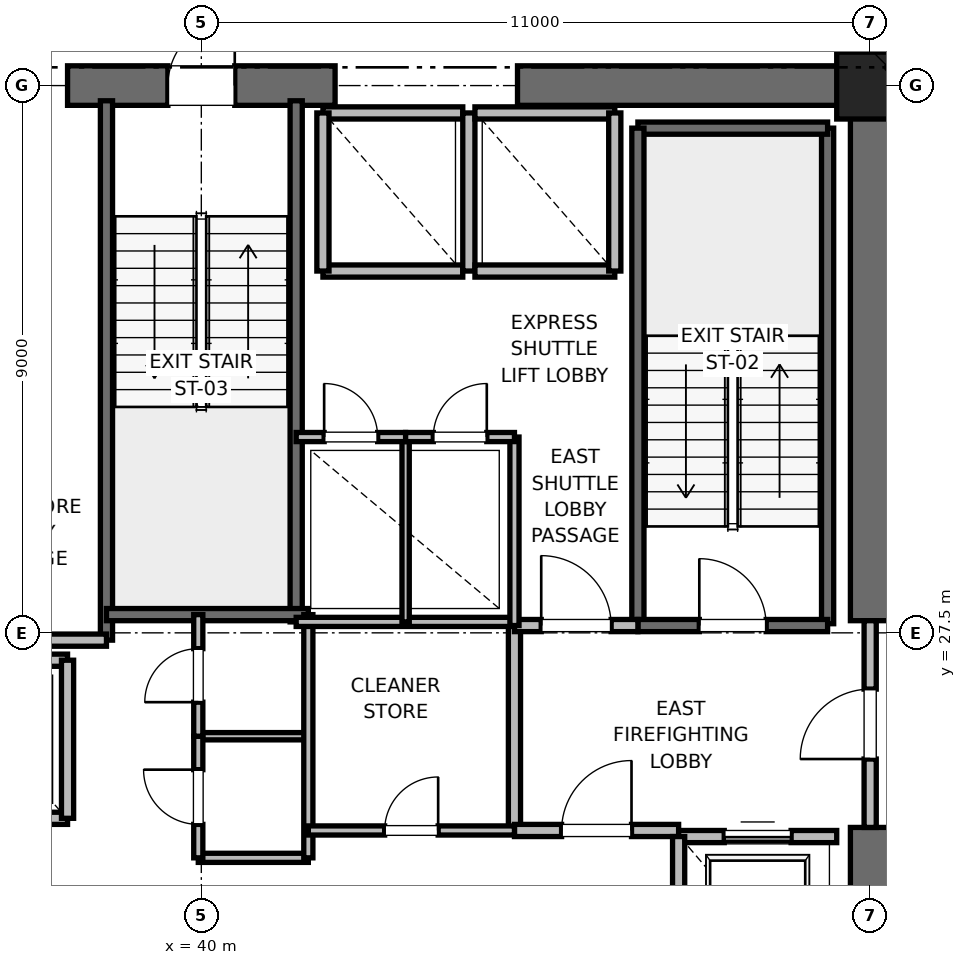
"""IFC4 building model, lengths in metres.
Left out: names, types, materials, properties, quantities, classifications, styles, units other than length and angle.
Written with IfcOpenShell. Run it as: python <this file> out.ifc"""

import sys

from ifc_helpers import new_model, si_unit, direction, frame, frame_2d, origin, origin_2d, place, context, subcontext, project, spatial, rectangle, extrude, element, fill, save


model = new_model("IFC4")
c1 = context("Model", 3, precision=1e-05, world=origin(), true_north=direction((0.0, 1.0)))
c2 = subcontext(c1, "Body", "Model", "MODEL_VIEW")
j1 = project(units=[si_unit("LENGTHUNIT", "METRE"), si_unit("PLANEANGLEUNIT", "RADIAN")], contexts=[c1])
p1 = place(None, origin())
s1 = spatial("IfcSite", under=j1, at=p1, CompositionType="ELEMENT")
p2 = place(p1, origin())
s2 = spatial("IfcBuilding", under=s1, at=p2, CompositionType="ELEMENT")
p3 = place(p2, frame((0.0, 0.0, 59.6)))
s3 = spatial("IfcBuildingStorey", under=s2, at=p3, CompositionType="ELEMENT", Elevation=59.6)
p4 = place(p3, frame((51.0, 36.5, 0.0), z_axis=(0.0, 0.0, 1.0), x_axis=(1.0, 0.0, 0.0)))
e1 = element("IfcColumn", 1, at=p4, inside=s3, PredefinedType="PILASTER", context=c2, shape_type="SweptSolid", body=[
    extrude(rectangle(XDim=1.1, YDim=1.1, at=origin_2d()), origin(), (0.0, 0.0, 1.0), 4.0),
])
p5 = place(p3, frame((37.8, 36.5, 0.0), z_axis=(0.0, 0.0, 1.0), x_axis=(1.0, 0.0, 0.0)))
e2 = element("IfcWall", 2, at=p5, inside=s3, PredefinedType="SHEAR", context=c2, shape_type="SweptSolid", body=[
    extrude(rectangle(XDim=4.4, YDim=0.65, at=frame_2d((2.2, 0.0))), origin(), (0.0, 0.0, 1.0), 3.76),
])
p6 = place(p5, frame((1.65, 0.0, 0.0)))
e3 = element("IfcOpeningElement", 3, at=p6, cuts=e2, PredefinedType="OPENING", context=c2, shape_type="SweptSolid", body=[
    extrude(rectangle(XDim=1.1, YDim=2.15, at=frame_2d((0.55, 1.075))), frame((0.0, 0.325, 0.0), z_axis=(0.0, -1.0, 0.0), x_axis=(1.0, 0.0, 0.0)), (0.0, 0.0, 1.0), 0.65),
])
for number, where, z_axis, x_axis in (
    (4, (45.2, 36.5, 0.0), (0.0, 0.0, 1.0), (1.0, 0.0, 0.0)),
    (5, (51.0, 18.5, 0.0), (0.0, 0.0, 1.0), (0.0, 1.0, 0.0)),
):
    element("IfcWall", number, at=place(p3, frame(where, z_axis=z_axis, x_axis=x_axis)), inside=s3, PredefinedType="SHEAR", context=c2, shape_type="SweptSolid", body=[
        extrude(rectangle(XDim=5.8, YDim=0.65, at=frame_2d((2.9, 0.0))), origin(), (0.0, 0.0, 1.0), 3.76),
    ])
p7 = place(p3, frame((51.0, 27.7, 0.0), z_axis=(0.0, 0.0, 1.0), x_axis=(0.0, 1.0, 0.0)))
e6 = element("IfcWall", 6, at=p7, inside=s3, PredefinedType="SHEAR", context=c2, shape_type="SweptSolid", body=[
    extrude(rectangle(XDim=8.8, YDim=0.65, at=frame_2d((4.4, 0.0))), origin(), (0.0, 0.0, 1.0), 3.76),
])
p8 = place(p3, frame((50.3, 27.65, 0.0), z_axis=(0.0, 0.0, 1.0), x_axis=(0.0, 1.0, 0.0)))
e7 = element("IfcWall", 7, at=p8, inside=s3, PredefinedType="SOLIDWALL", context=c2, shape_type="SweptSolid", body=[
    extrude(rectangle(XDim=8.15, YDim=0.2, at=frame_2d((4.075, 0.0))), origin(), (0.0, 0.0, 1.0), 3.76),
])
p9 = place(p3, frame((47.18, 35.8, 0.0), z_axis=(0.0, 0.0, 1.0), x_axis=(1.0, 0.0, 0.0)))
e8 = element("IfcWall", 8, at=p9, inside=s3, PredefinedType="SOLIDWALL", context=c2, shape_type="SweptSolid", body=[
    extrude(rectangle(XDim=3.12, YDim=0.2, at=frame_2d((1.56, 0.0))), origin(), (0.0, 0.0, 1.0), 3.76),
])
p10 = place(p3, frame((47.18, 27.62, 0.0), z_axis=(0.0, 0.0, 1.0), x_axis=(0.0, 1.0, 0.0)))
e9 = element("IfcWall", 9, at=p10, inside=s3, PredefinedType="SOLIDWALL", context=c2, shape_type="SweptSolid", body=[
    extrude(rectangle(XDim=8.18, YDim=0.2, at=frame_2d((4.09, 0.0))), origin(), (0.0, 0.0, 1.0), 3.76),
])
p11 = place(p3, frame((47.18, 27.62, 0.0), z_axis=(0.0, 0.0, 1.0), x_axis=(1.0, 0.0, 0.0)))
e10 = element("IfcWall", 10, at=p11, inside=s3, PredefinedType="SOLIDWALL", context=c2, shape_type="SweptSolid", body=[
    extrude(rectangle(XDim=3.12, YDim=0.2, at=frame_2d((1.56, 0.0))), origin(), (0.0, 0.0, 1.0), 3.76),
])
p12 = place(p11, frame((1.01, 0.0, 0.0)))
e11 = element("IfcOpeningElement", 11, at=p12, cuts=e10, PredefinedType="OPENING", context=c2, shape_type="SweptSolid", body=[
    extrude(rectangle(XDim=1.1, YDim=2.15, at=frame_2d((0.55, 1.075))), frame((0.0, 0.1, 0.0), z_axis=(0.0, -1.0, 0.0), x_axis=(1.0, 0.0, 0.0)), (0.0, 0.0, 1.0), 0.2),
])
p13 = place(p3, frame((38.44, 27.38, 0.0), z_axis=(0.0, 0.0, 1.0), x_axis=(0.0, 1.0, 0.0)))
e12 = element("IfcWall", 12, at=p13, inside=s3, PredefinedType="SOLIDWALL", context=c2, shape_type="SweptSolid", body=[
    extrude(rectangle(XDim=8.87, YDim=0.2, at=frame_2d((4.435, 0.0))), origin(), (0.0, 0.0, 1.0), 3.76),
])
p14 = place(p3, frame((41.56, 27.68, 0.0), z_axis=(0.0, 0.0, 1.0), x_axis=(0.0, 1.0, 0.0)))
e13 = element("IfcWall", 13, at=p14, inside=s3, PredefinedType="SOLIDWALL", context=c2, shape_type="SweptSolid", body=[
    extrude(rectangle(XDim=8.57, YDim=0.2, at=frame_2d((4.285, 0.0))), origin(), (0.0, 0.0, 1.0), 3.76),
])
p15 = place(p3, frame((38.44, 27.8, 0.0), z_axis=(0.0, 0.0, 1.0), x_axis=(1.0, 0.0, 0.0)))
e14 = element("IfcWall", 14, at=p15, inside=s3, PredefinedType="SOLIDWALL", context=c2, shape_type="SweptSolid", body=[
    extrude(rectangle(XDim=3.32, YDim=0.2, at=frame_2d((1.66, 0.0))), origin(), (0.0, 0.0, 1.0), 3.76),
])
p16 = place(p3, frame((32.82, 27.38, 0.0), z_axis=(0.0, 0.0, 1.0), x_axis=(1.0, 0.0, 0.0)))
e15 = element("IfcWall", 15, at=p16, inside=s3, PredefinedType="PARTITIONING", context=c2, shape_type="SweptSolid", body=[
    extrude(rectangle(XDim=5.62, YDim=0.2, at=frame_2d((2.81, 0.0))), origin(), (0.0, 0.0, 1.0), 3.76),
])
p17 = place(p3, frame((45.15, 24.25, 0.0), z_axis=(0.0, 0.0, 1.0), x_axis=(0.0, 1.0, 0.0)))
e16 = element("IfcWall", 16, at=p17, inside=s3, PredefinedType="PARTITIONING", context=c2, shape_type="SweptSolid", body=[
    extrude(rectangle(XDim=3.37, YDim=0.2, at=frame_2d((1.685, 0.0))), origin(), (0.0, 0.0, 1.0), 3.76),
])
p18 = place(p3, frame((45.15, 24.25, 0.0), z_axis=(0.0, 0.0, 1.0), x_axis=(1.0, 0.0, 0.0)))
e17 = element("IfcWall", 17, at=p18, inside=s3, PredefinedType="PARTITIONING", context=c2, shape_type="SweptSolid", body=[
    extrude(rectangle(XDim=2.7, YDim=0.2, at=frame_2d((1.35, 0.0))), origin(), (0.0, 0.0, 1.0), 3.76),
])
p19 = place(p18, frame((0.775, 0.0, 0.0)))
e18 = element("IfcOpeningElement", 18, at=p19, cuts=e17, PredefinedType="OPENING", context=c2, shape_type="SweptSolid", body=[
    extrude(rectangle(XDim=1.15, YDim=2.2, at=frame_2d((0.575, 1.1))), frame((0.0, 0.1, 0.0), z_axis=(0.0, -1.0, 0.0), x_axis=(1.0, 0.0, 0.0)), (0.0, 0.0, 1.0), 0.2),
])
p20 = place(p3, frame((45.15, 27.62, 0.0), z_axis=(0.0, 0.0, 1.0), x_axis=(1.0, 0.0, 0.0)))
e19 = element("IfcWall", 19, at=p20, inside=s3, PredefinedType="PARTITIONING", context=c2, shape_type="SweptSolid", body=[
    extrude(rectangle(XDim=2.03, YDim=0.2, at=frame_2d((1.015, 0.0))), origin(), (0.0, 0.0, 1.0), 3.76),
])
p21 = place(p20, frame((0.44, 0.0, 0.0)))
e20 = element("IfcOpeningElement", 20, at=p21, cuts=e19, PredefinedType="OPENING", context=c2, shape_type="SweptSolid", body=[
    extrude(rectangle(XDim=1.15, YDim=2.2, at=frame_2d((0.575, 1.1))), frame((0.0, 0.1, 0.0), z_axis=(0.0, -1.0, 0.0), x_axis=(1.0, 0.0, 0.0)), (0.0, 0.0, 1.0), 0.2),
])
p22 = place(p3, frame((51.0, 24.3, 0.0), z_axis=(0.0, 0.0, 1.0), x_axis=(0.0, 1.0, 0.0)))
e21 = element("IfcWall", 21, at=p22, inside=s3, PredefinedType="PARTITIONING", context=c2, shape_type="SweptSolid", body=[
    extrude(rectangle(XDim=3.4, YDim=0.2, at=frame_2d((1.7, 0.0))), origin(), (0.0, 0.0, 1.0), 2.54),
])
p23 = place(p22, frame((1.125, 0.0, 0.0)))
e22 = element("IfcOpeningElement", 22, at=p23, cuts=e21, PredefinedType="OPENING", context=c2, shape_type="SweptSolid", body=[
    extrude(rectangle(XDim=1.15, YDim=2.2, at=frame_2d((0.575, 1.1))), frame((0.0, 0.1, 0.0), z_axis=(0.0, -1.0, 0.0), x_axis=(1.0, 0.0, 0.0)), (0.0, 0.0, 1.0), 0.2),
])
p24 = place(p3, frame((50.45, 24.15, 0.0), z_axis=(0.0, 0.0, 1.0), x_axis=(-1.0, 0.0, 0.0)))
e23 = element("IfcWall", 23, at=p24, inside=s3, PredefinedType="SOLIDWALL", context=c2, shape_type="SweptSolid", body=[
    extrude(rectangle(XDim=2.6, YDim=0.2, at=frame_2d((1.3, 0.0))), origin(), (0.0, 0.0, 1.0), 2.54),
])
p25 = place(p24, frame((0.75, 0.0, 0.0)))
e24 = element("IfcOpeningElement", 24, at=p25, cuts=e23, PredefinedType="OPENING", context=c2, shape_type="SweptSolid", body=[
    extrude(rectangle(XDim=1.1, YDim=2.2, at=frame_2d((0.55, 1.1))), frame((0.0, 0.1, 0.0), z_axis=(0.0, -1.0, 0.0), x_axis=(1.0, 0.0, 0.0)), (0.0, 0.0, 1.0), 0.2),
])
p26 = place(p3, frame((47.85, 24.15, 0.0), z_axis=(0.0, 0.0, 1.0), x_axis=(0.0, -1.0, 0.0)))
e25 = element("IfcWall", 25, at=p26, inside=s3, PredefinedType="SOLIDWALL", context=c2, shape_type="SweptSolid", body=[
    extrude(rectangle(XDim=3.0, YDim=0.2, at=frame_2d((1.5, 0.0))), origin(), (0.0, 0.0, 1.0), 3.76),
])
p27 = place(p3, frame((35.5, 24.45, 0.0), z_axis=(0.0, 0.0, 1.0), x_axis=(1.0, 0.0, 0.0)))
e26 = element("IfcWall", 26, at=p27, inside=s3, PredefinedType="SOLIDWALL", context=c2, shape_type="SweptSolid", body=[
    extrude(rectangle(XDim=2.3, YDim=0.2, at=frame_2d((1.15, 0.0))), origin(), (0.0, 0.0, 1.0), 3.76),
])
p28 = place(p27, frame((0.6, 0.0, 0.0)))
e27 = element("IfcOpeningElement", 27, at=p28, cuts=e26, PredefinedType="OPENING", context=c2, shape_type="SweptSolid", body=[
    extrude(rectangle(XDim=1.1, YDim=2.2, at=frame_2d((0.55, 1.1))), frame((0.0, 0.1, 0.0), z_axis=(0.0, -1.0, 0.0), x_axis=(1.0, 0.0, 0.0)), (0.0, 0.0, 1.0), 0.2),
])
p29 = place(p3, frame((37.8, 27.05, 0.0), z_axis=(0.0, 0.0, 1.0), x_axis=(-1.0, 0.0, 0.0)))
e28 = element("IfcWall", 28, at=p29, inside=s3, PredefinedType="SOLIDWALL", context=c2, shape_type="SweptSolid", body=[
    extrude(rectangle(XDim=2.3, YDim=0.2, at=frame_2d((1.15, 0.0))), origin(), (0.0, 0.0, 1.0), 3.76),
])
p30 = place(p3, frame((37.8, 24.45, 0.0), z_axis=(0.0, 0.0, 1.0), x_axis=(0.0, 1.0, 0.0)))
e29 = element("IfcWall", 29, at=p30, inside=s3, PredefinedType="SOLIDWALL", context=c2, shape_type="SweptSolid", body=[
    extrude(rectangle(XDim=2.6, YDim=0.2, at=frame_2d((1.3, 0.0))), origin(), (0.0, 0.0, 1.0), 3.76),
])
p31 = place(p3, frame((42.0, 33.45, 0.0), z_axis=(0.0, 0.0, 1.0), x_axis=(1.0, 0.0, 0.0)))
e30 = element("IfcWall", 30, at=p31, inside=s3, PredefinedType="SOLIDWALL", context=c2, shape_type="SweptSolid", body=[
    extrude(rectangle(XDim=2.3, YDim=0.2, at=frame_2d((1.15, 0.0))), origin(), (0.0, 0.0, 1.0), 3.76),
])
p32 = place(p3, frame((44.3, 36.05, 0.0), z_axis=(0.0, 0.0, 1.0), x_axis=(-1.0, 0.0, 0.0)))
e31 = element("IfcWall", 31, at=p32, inside=s3, PredefinedType="SOLIDWALL", context=c2, shape_type="SweptSolid", body=[
    extrude(rectangle(XDim=2.3, YDim=0.2, at=frame_2d((1.15, 0.0))), origin(), (0.0, 0.0, 1.0), 2.54),
])
for number, where, z_axis, x_axis in (
    (32, (42.0, 36.05, 0.0), (0.0, 0.0, 1.0), (0.0, -1.0, 0.0)),
    (33, (44.4, 33.45, 0.0), (0.0, 0.0, 1.0), (0.0, 1.0, 0.0)),
):
    element("IfcWall", number, at=place(p3, frame(where, z_axis=z_axis, x_axis=x_axis)), inside=s3, PredefinedType="SOLIDWALL", context=c2, shape_type="SweptSolid", body=[
        extrude(rectangle(XDim=2.6, YDim=0.2, at=frame_2d((1.3, 0.0))), origin(), (0.0, 0.0, 1.0), 2.54),
    ])
p33 = place(p3, frame((44.5, 33.45, 0.0), z_axis=(0.0, 0.0, 1.0), x_axis=(1.0, 0.0, 0.0)))
e34 = element("IfcWall", 34, at=p33, inside=s3, PredefinedType="SOLIDWALL", context=c2, shape_type="SweptSolid", body=[
    extrude(rectangle(XDim=2.3, YDim=0.2, at=frame_2d((1.15, 0.0))), origin(), (0.0, 0.0, 1.0), 3.76),
])
p34 = place(p3, frame((46.8, 36.05, 0.0), z_axis=(0.0, 0.0, 1.0), x_axis=(-1.0, 0.0, 0.0)))
e35 = element("IfcWall", 35, at=p34, inside=s3, PredefinedType="SOLIDWALL", context=c2, shape_type="SweptSolid", body=[
    extrude(rectangle(XDim=2.3, YDim=0.2, at=frame_2d((1.15, 0.0))), origin(), (0.0, 0.0, 1.0), 2.54),
])
p35 = place(p3, frame((46.8, 33.45, 0.0), z_axis=(0.0, 0.0, 1.0), x_axis=(0.0, 1.0, 0.0)))
e36 = element("IfcWall", 36, at=p35, inside=s3, PredefinedType="SOLIDWALL", context=c2, shape_type="SweptSolid", body=[
    extrude(rectangle(XDim=2.6, YDim=0.2, at=frame_2d((1.3, 0.0))), origin(), (0.0, 0.0, 1.0), 3.76),
])
p36 = place(p3, frame((39.95, 23.8, 0.0), z_axis=(0.0, 0.0, 1.0), x_axis=(1.0, 0.0, 0.0)))
e37 = element("IfcWall", 37, at=p36, inside=s3, PredefinedType="PARTITIONING", context=c2, shape_type="SweptSolid", body=[
    extrude(rectangle(XDim=1.81, YDim=0.15, at=frame_2d((0.905, 0.0))), origin(), (0.0, 0.0, 1.0), 2.85),
])
p37 = place(p3, frame((39.95, 25.8, 0.0), z_axis=(0.0, 0.0, 1.0), x_axis=(1.0, 0.0, 0.0)))
e38 = element("IfcWall", 38, at=p37, inside=s3, PredefinedType="PARTITIONING", context=c2, shape_type="SweptSolid", body=[
    extrude(rectangle(XDim=1.81, YDim=0.12, at=frame_2d((0.905, 0.0))), origin(), (0.0, 0.0, 1.0), 2.85),
])
p38 = place(p3, frame((41.76, 23.8, 0.0), z_axis=(0.0, 0.0, 1.0), x_axis=(0.0, 1.0, 0.0)))
e39 = element("IfcWall", 39, at=p38, inside=s3, PredefinedType="PARTITIONING", context=c2, shape_type="SweptSolid", body=[
    extrude(rectangle(XDim=4.0, YDim=0.15, at=frame_2d((2.0, 0.0))), origin(), (0.0, 0.0, 1.0), 2.85),
])
p39 = place(p3, frame((39.95, 23.8, 0.0), z_axis=(0.0, 0.0, 1.0), x_axis=(0.0, 1.0, 0.0)))
e40 = element("IfcWall", 40, at=p39, inside=s3, PredefinedType="PARTITIONING", context=c2, shape_type="SweptSolid", body=[
    extrude(rectangle(XDim=2.0, YDim=0.15, at=frame_2d((1.0, 0.0))), origin(), (0.0, 0.0, 1.0), 2.85),
])
p40 = place(p39, frame((0.55, 0.0, 0.0)))
e41 = element("IfcOpeningElement", 41, at=p40, cuts=e40, PredefinedType="OPENING", context=c2, shape_type="SweptSolid", body=[
    extrude(rectangle(XDim=0.9, YDim=2.1, at=frame_2d((0.45, 1.05))), frame((0.0, 0.075, 0.0), z_axis=(0.0, -1.0, 0.0), x_axis=(1.0, 0.0, 0.0)), (0.0, 0.0, 1.0), 0.15),
])
p41 = place(p3, frame((39.95, 25.8, 0.0), z_axis=(0.0, 0.0, 1.0), x_axis=(0.0, 1.0, 0.0)))
e42 = element("IfcWall", 42, at=p41, inside=s3, PredefinedType="PARTITIONING", context=c2, shape_type="SweptSolid", body=[
    extrude(rectangle(XDim=2.0, YDim=0.15, at=frame_2d((1.0, 0.0))), origin(), (0.0, 0.0, 1.0), 2.85),
])
p42 = place(p41, frame((0.56, 0.0, 0.0)))
e43 = element("IfcOpeningElement", 43, at=p42, cuts=e42, PredefinedType="OPENING", context=c2, shape_type="SweptSolid", body=[
    extrude(rectangle(XDim=0.88, YDim=2.1, at=frame_2d((0.44, 1.05))), frame((0.0, 0.075, 0.0), z_axis=(0.0, -1.0, 0.0), x_axis=(1.0, 0.0, 0.0)), (0.0, 0.0, 1.0), 0.15),
])
p43 = place(p3, frame((41.56, 27.68, 0.0), z_axis=(0.0, 0.0, 1.0), x_axis=(1.0, 0.0, 0.0)))
e44 = element("IfcWall", 44, at=p43, inside=s3, PredefinedType="PARTITIONING", context=c2, shape_type="SweptSolid", body=[
    extrude(rectangle(XDim=3.59, YDim=0.15, at=frame_2d((1.795, 0.0))), origin(), (0.0, 0.0, 1.0), 2.85),
])
p44 = place(p3, frame((41.76, 24.25, 0.0), z_axis=(0.0, 0.0, 1.0), x_axis=(1.0, 0.0, 0.0)))
e45 = element("IfcWall", 45, at=p44, inside=s3, PredefinedType="PARTITIONING", context=c2, shape_type="SweptSolid", body=[
    extrude(rectangle(XDim=3.39, YDim=0.15, at=frame_2d((1.695, 0.0))), origin(), (0.0, 0.0, 1.0), 2.85),
])
p45 = place(p44, frame((1.255, 0.0, 0.0)))
e46 = element("IfcOpeningElement", 46, at=p45, cuts=e45, PredefinedType="OPENING", context=c2, shape_type="SweptSolid", body=[
    extrude(rectangle(XDim=0.88, YDim=2.1, at=frame_2d((0.44, 1.05))), frame((0.0, 0.075, 0.0), z_axis=(0.0, -1.0, 0.0), x_axis=(1.0, 0.0, 0.0)), (0.0, 0.0, 1.0), 0.15),
])
p46 = place(p3, frame((45.15, 27.62, 0.0), z_axis=(0.0, 0.0, 1.0), x_axis=(0.0, 1.0, 0.0)))
e47 = element("IfcWall", 47, at=p46, inside=s3, PredefinedType="PARTITIONING", context=c2, shape_type="SweptSolid", body=[
    extrude(rectangle(XDim=3.1, YDim=0.15, at=frame_2d((1.55, 0.0))), origin(), (0.0, 0.0, 1.0), 2.85),
])
p47 = place(p3, frame((43.36, 27.68, 0.0), z_axis=(0.0, 0.0, 1.0), x_axis=(0.0, 1.0, 0.0)))
e48 = element("IfcWall", 48, at=p47, inside=s3, PredefinedType="PARTITIONING", context=c2, shape_type="SweptSolid", body=[
    extrude(rectangle(XDim=3.04, YDim=0.12, at=frame_2d((1.52, 0.0))), origin(), (0.0, 0.0, 1.0), 2.85),
])
p48 = place(p3, frame((41.56, 30.72, 0.0), z_axis=(0.0, 0.0, 1.0), x_axis=(1.0, 0.0, 0.0)))
e49 = element("IfcWall", 49, at=p48, inside=s3, PredefinedType="PARTITIONING", context=c2, shape_type="SweptSolid", body=[
    extrude(rectangle(XDim=1.8, YDim=0.15, at=frame_2d((0.9, 0.0))), origin(), (0.0, 0.0, 1.0), 2.85),
])
p49 = place(p48, frame((0.46, 0.0, 0.0)))
e50 = element("IfcOpeningElement", 50, at=p49, cuts=e49, PredefinedType="OPENING", context=c2, shape_type="SweptSolid", body=[
    extrude(rectangle(XDim=0.88, YDim=2.1, at=frame_2d((0.44, 1.05))), frame((0.0, 0.075, 0.0), z_axis=(0.0, -1.0, 0.0), x_axis=(1.0, 0.0, 0.0)), (0.0, 0.0, 1.0), 0.15),
])
p50 = place(p3, frame((43.36, 30.72, 0.0), z_axis=(0.0, 0.0, 1.0), x_axis=(1.0, 0.0, 0.0)))
e51 = element("IfcWall", 51, at=p50, inside=s3, PredefinedType="PARTITIONING", context=c2, shape_type="SweptSolid", body=[
    extrude(rectangle(XDim=1.79, YDim=0.15, at=frame_2d((0.895, 0.0))), origin(), (0.0, 0.0, 1.0), 2.85),
])
p51 = place(p50, frame((0.455, 0.0, 0.0)))
e52 = element("IfcOpeningElement", 52, at=p51, cuts=e51, PredefinedType="OPENING", context=c2, shape_type="SweptSolid", body=[
    extrude(rectangle(XDim=0.88, YDim=2.1, at=frame_2d((0.44, 1.05))), frame((0.0, 0.075, 0.0), z_axis=(0.0, -1.0, 0.0), x_axis=(1.0, 0.0, 0.0)), (0.0, 0.0, 1.0), 0.15),
])
p52 = place(p12, origin())
e53 = element("IfcDoor", 53, at=p52, inside=s3, OperationType="SINGLE_SWING_LEFT", PredefinedType="DOOR", context=c2, shape_type="SweptSolid", body=[
    extrude(rectangle(XDim=1.1, YDim=2.15, at=frame_2d((0.55, 1.075))), frame((0.0, 0.025, 0.0), z_axis=(0.0, -1.0, 0.0), x_axis=(1.0, 0.0, 0.0)), (0.0, 0.0, 1.0), 0.05),
])
fill(e11, e53)
p53 = place(p6, origin())
e54 = element("IfcDoor", 54, at=p53, inside=s3, OperationType="SINGLE_SWING_RIGHT", PredefinedType="DOOR", context=c2, shape_type="SweptSolid", body=[
    extrude(rectangle(XDim=1.1, YDim=2.15, at=frame_2d((0.55, 1.075))), frame((0.0, 0.025, 0.0), z_axis=(0.0, -1.0, 0.0), x_axis=(1.0, 0.0, 0.0)), (0.0, 0.0, 1.0), 0.05),
])
fill(e3, e54)
p54 = place(p19, origin())
e55 = element("IfcDoor", 55, at=p54, inside=s3, OperationType="SINGLE_SWING_RIGHT", PredefinedType="DOOR", context=c2, shape_type="SweptSolid", body=[
    extrude(rectangle(XDim=1.15, YDim=2.2, at=frame_2d((0.575, 1.1))), frame((0.0, 0.025, 0.0), z_axis=(0.0, -1.0, 0.0), x_axis=(1.0, 0.0, 0.0)), (0.0, 0.0, 1.0), 0.05),
])
fill(e18, e55)
p55 = place(p21, origin())
e56 = element("IfcDoor", 56, at=p55, inside=s3, OperationType="SINGLE_SWING_LEFT", PredefinedType="DOOR", context=c2, shape_type="SweptSolid", body=[
    extrude(rectangle(XDim=1.15, YDim=2.2, at=frame_2d((0.575, 1.1))), frame((0.0, 0.025, 0.0), z_axis=(0.0, -1.0, 0.0), x_axis=(1.0, 0.0, 0.0)), (0.0, 0.0, 1.0), 0.05),
])
fill(e20, e56)
p56 = place(p23, origin())
e57 = element("IfcDoor", 57, at=p56, inside=s3, OperationType="SINGLE_SWING_LEFT", PredefinedType="DOOR", context=c2, shape_type="SweptSolid", body=[
    extrude(rectangle(XDim=1.15, YDim=2.2, at=frame_2d((0.575, 1.1))), frame((0.0, 0.025, 0.0), z_axis=(0.0, -1.0, 0.0), x_axis=(1.0, 0.0, 0.0)), (0.0, 0.0, 1.0), 0.05),
])
fill(e22, e57)
p57 = place(p25, origin())
e58 = element("IfcDoor", 58, at=p57, inside=s3, OperationType="SLIDING_TO_RIGHT", PredefinedType="DOOR", context=c2, shape_type="SweptSolid", body=[
    extrude(rectangle(XDim=1.1, YDim=2.2, at=frame_2d((0.55, 1.1))), frame((0.0, 0.025, 0.0), z_axis=(0.0, -1.0, 0.0), x_axis=(1.0, 0.0, 0.0)), (0.0, 0.0, 1.0), 0.05),
])
fill(e24, e58)
p58 = place(p40, origin())
e59 = element("IfcDoor", 59, at=p58, inside=s3, OperationType="SINGLE_SWING_RIGHT", PredefinedType="DOOR", context=c2, shape_type="SweptSolid", body=[
    extrude(rectangle(XDim=0.9, YDim=2.1, at=frame_2d((0.45, 1.05))), frame((0.0, 0.025, 0.0), z_axis=(0.0, -1.0, 0.0), x_axis=(1.0, 0.0, 0.0)), (0.0, 0.0, 1.0), 0.05),
])
fill(e41, e59)
p59 = place(p42, origin())
e60 = element("IfcDoor", 60, at=p59, inside=s3, OperationType="SINGLE_SWING_LEFT", PredefinedType="DOOR", context=c2, shape_type="SweptSolid", body=[
    extrude(rectangle(XDim=0.88, YDim=2.1, at=frame_2d((0.44, 1.05))), frame((0.0, 0.025, 0.0), z_axis=(0.0, -1.0, 0.0), x_axis=(1.0, 0.0, 0.0)), (0.0, 0.0, 1.0), 0.05),
])
fill(e43, e60)
p60 = place(p45, origin())
e61 = element("IfcDoor", 61, at=p60, inside=s3, OperationType="SINGLE_SWING_RIGHT", PredefinedType="DOOR", context=c2, shape_type="SweptSolid", body=[
    extrude(rectangle(XDim=0.88, YDim=2.1, at=frame_2d((0.44, 1.05))), frame((0.0, 0.025, 0.0), z_axis=(0.0, -1.0, 0.0), x_axis=(1.0, 0.0, 0.0)), (0.0, 0.0, 1.0), 0.05),
])
fill(e46, e61)
p61 = place(p49, origin())
e62 = element("IfcDoor", 62, at=p61, inside=s3, OperationType="SINGLE_SWING_LEFT", PredefinedType="DOOR", context=c2, shape_type="SweptSolid", body=[
    extrude(rectangle(XDim=0.88, YDim=2.1, at=frame_2d((0.44, 1.05))), frame((0.0, 0.025, 0.0), z_axis=(0.0, -1.0, 0.0), x_axis=(1.0, 0.0, 0.0)), (0.0, 0.0, 1.0), 0.05),
])
fill(e50, e62)
p62 = place(p51, origin())
e63 = element("IfcDoor", 63, at=p62, inside=s3, OperationType="SINGLE_SWING_RIGHT", PredefinedType="DOOR", context=c2, shape_type="SweptSolid", body=[
    extrude(rectangle(XDim=0.88, YDim=2.1, at=frame_2d((0.44, 1.05))), frame((0.0, 0.025, 0.0), z_axis=(0.0, -1.0, 0.0), x_axis=(1.0, 0.0, 0.0)), (0.0, 0.0, 1.0), 0.05),
])
fill(e52, e63)
save(model, sys.argv[1])
